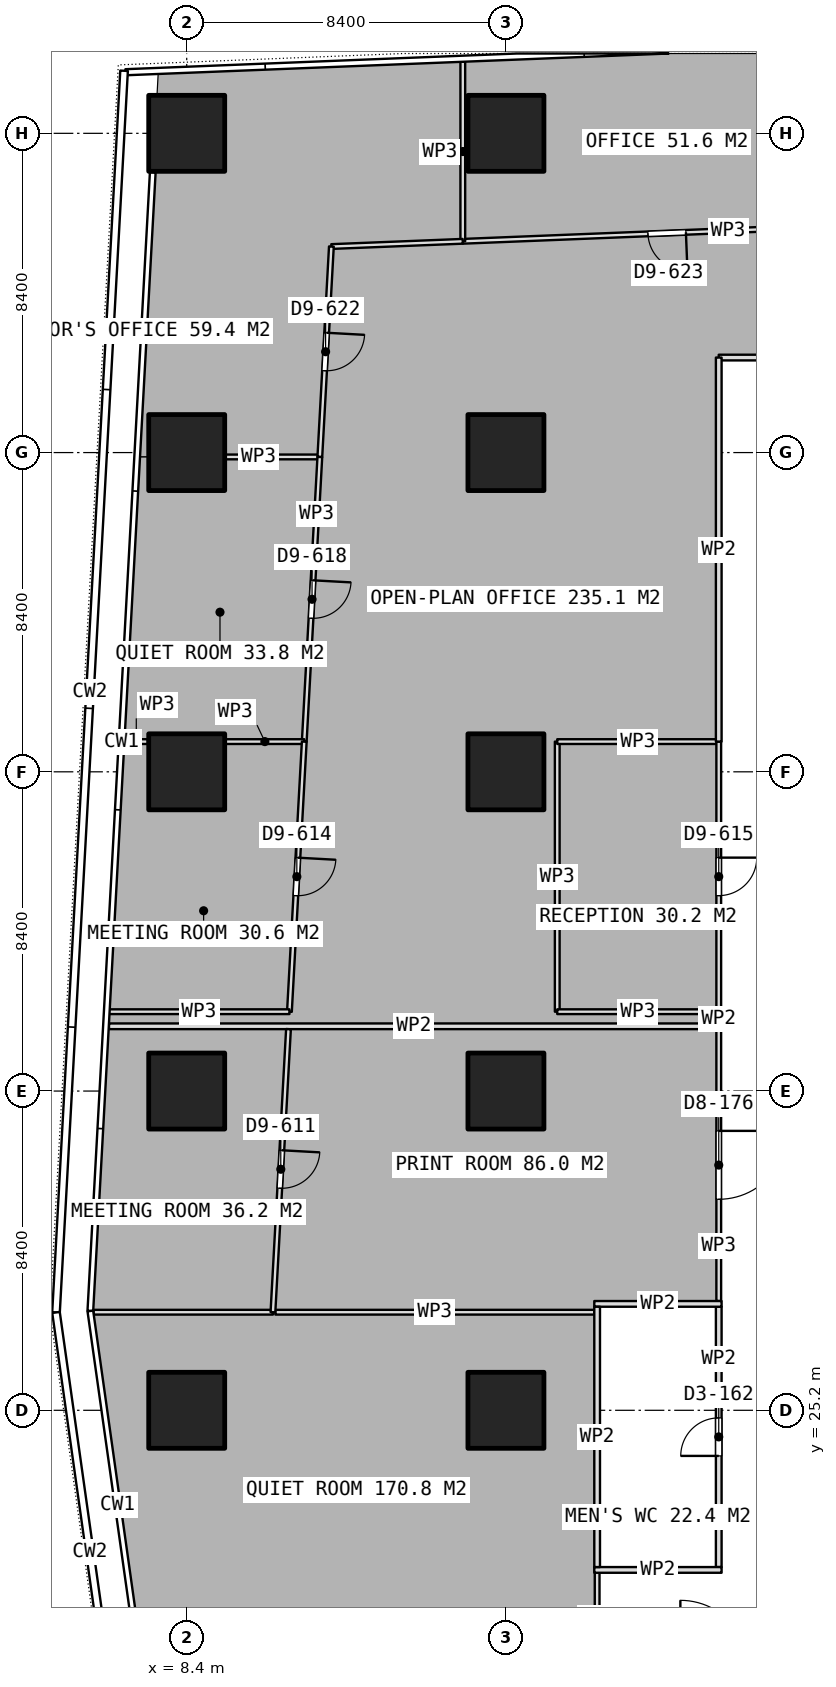
"""IFC4 building model, lengths in metres.
Left out: names, types, materials, properties, quantities, classifications, styles, units other than length and angle.
Written with IfcOpenShell. Run it as: python <this file> out.ifc"""

import sys

from ifc_helpers import new_model, si_unit, direction, frame, frame_2d, origin, origin_2d, place, context, subcontext, project, spatial, rectangle, extrude, element, fill, save


model = new_model("IFC4")
c1 = context("Model", 3, precision=1e-05, world=origin(), true_north=direction((0.0, 1.0)))
c2 = subcontext(c1, "Body", "Model", "MODEL_VIEW")
j1 = project(units=[si_unit("LENGTHUNIT", "METRE"), si_unit("PLANEANGLEUNIT", "RADIAN")], contexts=[c1])
p1 = place(None, origin())
s1 = spatial("IfcSite", under=j1, at=p1, CompositionType="ELEMENT")
p2 = place(p1, origin())
s2 = spatial("IfcBuilding", under=s1, at=p2, CompositionType="ELEMENT")
p3 = place(p2, frame((0.0, 0.0, 151.55)))
s3 = spatial("IfcBuildingStorey", under=s2, at=p3, CompositionType="ELEMENT", Elevation=151.55)
for number, where, z_axis, x_axis in (
    (1, (8.4, 25.2, 0.0), (0.0, 0.0, 1.0), (1.0, 0.0, 0.0)),
    (2, (8.4, 33.6, 0.0), (0.0, 0.0, 1.0), (1.0, 0.0, 0.0)),
    (3, (8.4, 42.0, 0.0), (0.0, 0.0, 1.0), (1.0, 0.0, 0.0)),
    (4, (8.4, 50.4, 0.0), (0.0, 0.0, 1.0), (1.0, 0.0, 0.0)),
    (5, (8.4, 58.8, 0.0), (0.0, 0.0, 1.0), (1.0, 0.0, 0.0)),
    (6, (16.8, 25.2, 0.0), (0.0, 0.0, 1.0), (1.0, 0.0, 0.0)),
    (7, (16.8, 33.6, 0.0), (0.0, 0.0, 1.0), (1.0, 0.0, 0.0)),
    (8, (16.8, 42.0, 0.0), (0.0, 0.0, 1.0), (1.0, 0.0, 0.0)),
    (9, (16.8, 50.4, 0.0), (0.0, 0.0, 1.0), (1.0, 0.0, 0.0)),
    (10, (16.8, 58.8, 0.0), (0.0, 0.0, 1.0), (1.0, 0.0, 0.0)),
):
    element("IfcColumn", number, at=place(p3, frame(where, z_axis=z_axis, x_axis=x_axis)), inside=s3, PredefinedType="COLUMN", context=c2, shape_type="SweptSolid", body=[
        extrude(rectangle(XDim=2.0, YDim=2.0, at=origin_2d()), origin(), (0.0, 0.0, 1.0), 3.75),
    ])
for number, where, z_axis, x_axis in (
    (11, (19.125, 21.0, 0.0), (0.0, 0.0, 1.0), (1.0, 0.0, 0.0)),
    (12, (19.125, 28.0, 0.0), (0.0, 0.0, 1.0), (1.0, 0.0, 0.0)),
):
    element("IfcWall", number, at=place(p3, frame(where, z_axis=z_axis, x_axis=x_axis)), inside=s3, PredefinedType="PARTITIONING", context=c2, shape_type="SweptSolid", body=[
        extrude(rectangle(XDim=3.35, YDim=0.15, at=frame_2d((1.675, 0.0))), origin(), (0.0, 0.0, 1.0), 3.5),
    ])
p4 = place(p3, frame((19.2, 21.075, 0.0), z_axis=(0.0, 0.0, 1.0), x_axis=(0.0, 1.0, 0.0)))
e13 = element("IfcWall", 13, at=p4, inside=s3, PredefinedType="PARTITIONING", context=c2, shape_type="SweptSolid", body=[
    extrude(rectangle(XDim=6.85, YDim=0.15, at=frame_2d((3.425, 0.0))), origin(), (0.0, 0.0, 1.0), 3.5),
])
p5 = place(p3, frame((22.4, 21.075, 0.0), z_axis=(0.0, 0.0, 1.0), x_axis=(0.0, 1.0, 0.0)))
e14 = element("IfcWall", 14, at=p5, inside=s3, PredefinedType="PARTITIONING", context=c2, shape_type="SweptSolid", body=[
    extrude(rectangle(XDim=6.85, YDim=0.15, at=frame_2d((3.425, 0.0))), origin(), (0.0, 0.0, 1.0), 3.5),
])
p6 = place(p5, frame((2.925, 0.0, 0.0)))
e15 = element("IfcOpeningElement", 15, at=p6, cuts=e14, PredefinedType="OPENING", context=c2, shape_type="SweptSolid", body=[
    extrude(rectangle(XDim=1.0, YDim=2.1, at=frame_2d((0.5, 1.05))), frame((0.0, 0.085, 0.0), z_axis=(0.0, -1.0, 0.0), x_axis=(1.0, 0.0, 0.0)), (0.0, 0.0, 1.0), 0.17),
])
p7 = place(p3, frame((5.949, 27.781, 0.0), z_axis=(0.0, 0.0, 1.0), x_axis=(1.0, 0.0, 0.0)))
e16 = element("IfcWall", 16, at=p7, inside=s3, PredefinedType="PARTITIONING", context=c2, shape_type="SweptSolid", body=[
    extrude(rectangle(XDim=4.72, YDim=0.125, at=frame_2d((2.36, 0.0))), origin(), (0.0, 0.0, 1.0), 3.5),
])
p8 = place(p3, frame((10.732, 27.781, 0.0), z_axis=(0.0, 0.0, 1.0), x_axis=(1.0, 0.0, 0.0)))
e17 = element("IfcWall", 17, at=p8, inside=s3, PredefinedType="PARTITIONING", context=c2, shape_type="SweptSolid", body=[
    extrude(rectangle(XDim=8.393, YDim=0.125, at=frame_2d((4.197, 0.0))), origin(), (0.0, 0.0, 1.0), 3.5),
])
p9 = place(p3, frame((19.2, 21.075, 0.0), z_axis=(0.0, 0.0, 1.0), x_axis=(0.0, -1.0, 0.0)))
e18 = element("IfcWall", 18, at=p9, inside=s3, PredefinedType="PARTITIONING", context=c2, shape_type="SweptSolid", body=[
    extrude(rectangle(XDim=2.675, YDim=0.125, at=frame_2d((1.337, 0.0))), origin(), (0.0, 0.0, 1.0), 3.5),
])
p10 = place(p3, frame((26.407, 56.39, 0.0), z_axis=(0.0, 0.0, 1.0), x_axis=(-0.999196381261, -0.040082311255, 0.0)))
e19 = element("IfcWall", 19, at=p10, inside=s3, PredefinedType="PARTITIONING", context=c2, shape_type="SweptSolid", body=[
    extrude(rectangle(XDim=10.75, YDim=0.125, at=frame_2d((5.375, 0.0))), origin(), (0.0, 0.0, 1.0), 3.5),
])
p11 = place(p10, frame((4.875, 0.0, 0.0)))
e20 = element("IfcOpeningElement", 20, at=p11, cuts=e19, PredefinedType="OPENING", context=c2, shape_type="SweptSolid", body=[
    extrude(rectangle(XDim=1.0, YDim=2.1, at=frame_2d((0.5, 1.05))), frame((0.0, 0.073, 0.0), z_axis=(0.0, -1.0, 0.0), x_axis=(1.0, 0.0, 0.0)), (0.0, 0.0, 1.0), 0.145),
])
p12 = place(p3, frame((15.665, 55.959, 0.0), z_axis=(0.0, 0.0, 1.0), x_axis=(0.0, 1.0, 0.0)))
e21 = element("IfcWall", 21, at=p12, inside=s3, PredefinedType="PARTITIONING", context=c2, shape_type="SweptSolid", body=[
    extrude(rectangle(XDim=4.724, YDim=0.125, at=frame_2d((2.362, 0.0))), origin(), (0.0, 0.0, 1.0), 3.5),
])
p13 = place(p3, frame((11.903, 50.285, 0.0), z_axis=(0.0, 0.0, 1.0), x_axis=(-1.0, 0.0, 0.0)))
e22 = element("IfcWall", 22, at=p13, inside=s3, PredefinedType="PARTITIONING", context=c2, shape_type="SweptSolid", body=[
    extrude(rectangle(XDim=2.483, YDim=0.125, at=frame_2d((1.242, 0.0))), origin(), (0.0, 0.0, 1.0), 3.5),
])
p14 = place(p3, frame((15.664, 55.959, 0.0), z_axis=(0.0, 0.0, 1.0), x_axis=(-0.999204899199, -0.039869404523, 0.0)))
e23 = element("IfcWall", 23, at=p14, inside=s3, PredefinedType="PARTITIONING", context=c2, shape_type="SweptSolid", body=[
    extrude(rectangle(XDim=3.46, YDim=0.125, at=frame_2d((1.73, 0.0))), origin(), (0.0, 0.0, 1.0), 3.5),
])
p15 = place(p3, frame((12.207, 55.821, 0.0), z_axis=(0.0, 0.0, 1.0), x_axis=(-0.054821297693, -0.998496181925, 0.0)))
e24 = element("IfcWall", 24, at=p15, inside=s3, PredefinedType="PARTITIONING", context=c2, shape_type="SweptSolid", body=[
    extrude(rectangle(XDim=5.544, YDim=0.125, at=frame_2d((2.772, 0.0))), origin(), (0.0, 0.0, 1.0), 3.5),
])
p16 = place(p15, frame((2.272, 0.0, 0.0)))
e25 = element("IfcOpeningElement", 25, at=p16, cuts=e24, PredefinedType="OPENING", context=c2, shape_type="SweptSolid", body=[
    extrude(rectangle(XDim=1.0, YDim=2.1, at=frame_2d((0.5, 1.05))), frame((0.0, 0.073, 0.0), z_axis=(0.0, -1.0, 0.0), x_axis=(1.0, 0.0, 0.0)), (0.0, 0.0, 1.0), 0.145),
])
p17 = place(p3, frame((11.903, 50.284, 0.0), z_axis=(0.0, 0.0, 1.0), x_axis=(-0.054685772478, -0.998503613558, 0.0)))
e26 = element("IfcWall", 26, at=p17, inside=s3, PredefinedType="PARTITIONING", context=c2, shape_type="SweptSolid", body=[
    extrude(rectangle(XDim=7.5, YDim=0.125, at=frame_2d((3.75, 0.0))), origin(), (0.0, 0.0, 1.0), 3.5),
])
p18 = place(p17, frame((3.25, 0.0, 0.0)))
e27 = element("IfcOpeningElement", 27, at=p18, cuts=e26, PredefinedType="OPENING", context=c2, shape_type="SweptSolid", body=[
    extrude(rectangle(XDim=1.0, YDim=2.1, at=frame_2d((0.5, 1.05))), frame((0.0, 0.073, 0.0), z_axis=(0.0, -1.0, 0.0), x_axis=(1.0, 0.0, 0.0)), (0.0, 0.0, 1.0), 0.145),
])
p19 = place(p3, frame((11.493, 42.795, 0.0), z_axis=(0.0, 0.0, 1.0), x_axis=(-1.0, 0.0, 0.0)))
e28 = element("IfcWall", 28, at=p19, inside=s3, PredefinedType="PARTITIONING", context=c2, shape_type="SweptSolid", body=[
    extrude(rectangle(XDim=2.073, YDim=0.125, at=frame_2d((1.037, 0.0))), origin(), (0.0, 0.0, 1.0), 3.5),
])
p20 = place(p3, frame((7.38, 42.795, 0.0), z_axis=(0.0, 0.0, 1.0), x_axis=(-1.0, 0.0, 0.0)))
e29 = element("IfcWall", 29, at=p20, inside=s3, PredefinedType="PARTITIONING", context=c2, shape_type="SweptSolid", body=[
    extrude(rectangle(XDim=0.614, YDim=0.125, at=frame_2d((0.307, 0.0))), origin(), (0.0, 0.0, 1.0), 3.5),
])
p21 = place(p3, frame((11.493, 42.794, 0.0), z_axis=(0.0, 0.0, 1.0), x_axis=(-0.054786006182, -0.99849811894, 0.0)))
e30 = element("IfcWall", 30, at=p21, inside=s3, PredefinedType="PARTITIONING", context=c2, shape_type="SweptSolid", body=[
    extrude(rectangle(XDim=7.117, YDim=0.125, at=frame_2d((3.558, 0.0))), origin(), (0.0, 0.0, 1.0), 3.5),
])
p22 = place(p21, frame((3.058, 0.0, 0.0)))
e31 = element("IfcOpeningElement", 31, at=p22, cuts=e30, PredefinedType="OPENING", context=c2, shape_type="SweptSolid", body=[
    extrude(rectangle(XDim=1.0, YDim=2.1, at=frame_2d((0.5, 1.05))), frame((0.0, 0.073, 0.0), z_axis=(0.0, -1.0, 0.0), x_axis=(1.0, 0.0, 0.0)), (0.0, 0.0, 1.0), 0.145),
])
p23 = place(p3, frame((11.103, 35.688, 0.0), z_axis=(0.0, 0.0, 1.0), x_axis=(-1.0, 0.0, 0.0)))
e32 = element("IfcWall", 32, at=p23, inside=s3, PredefinedType="PARTITIONING", context=c2, shape_type="SweptSolid", body=[
    extrude(rectangle(XDim=4.757, YDim=0.125, at=frame_2d((2.378, 0.0))), origin(), (0.0, 0.0, 1.0), 3.5),
])
p24 = place(p3, frame((18.15, 35.688, 0.0), z_axis=(0.0, 0.0, 1.0), x_axis=(0.0, 1.0, 0.0)))
e33 = element("IfcWall", 33, at=p24, inside=s3, PredefinedType="PARTITIONING", context=c2, shape_type="SweptSolid", body=[
    extrude(rectangle(XDim=7.107, YDim=0.125, at=frame_2d((3.553, 0.0))), origin(), (0.0, 0.0, 1.0), 3.5),
])
p25 = place(p3, frame((18.15, 42.795, 0.0), z_axis=(0.0, 0.0, 1.0), x_axis=(1.0, 0.0, 0.0)))
e34 = element("IfcWall", 34, at=p25, inside=s3, PredefinedType="PARTITIONING", context=c2, shape_type="SweptSolid", body=[
    extrude(rectangle(XDim=4.25, YDim=0.125, at=frame_2d((2.125, 0.0))), origin(), (0.0, 0.0, 1.0), 3.5),
])
p26 = place(p3, frame((22.4, 42.795, 0.0), z_axis=(0.0, 0.0, 1.0), x_axis=(0.0, -1.0, 0.0)))
e35 = element("IfcWall", 35, at=p26, inside=s3, PredefinedType="PARTITIONING", context=c2, shape_type="SweptSolid", body=[
    extrude(rectangle(XDim=7.107, YDim=0.125, at=frame_2d((3.553, 0.0))), origin(), (0.0, 0.0, 1.0), 3.5),
])
p27 = place(p26, frame((3.053, 0.0, 0.0)))
e36 = element("IfcOpeningElement", 36, at=p27, cuts=e35, PredefinedType="OPENING", context=c2, shape_type="SweptSolid", body=[
    extrude(rectangle(XDim=1.0, YDim=2.1, at=frame_2d((0.5, 1.05))), frame((0.0, 0.073, 0.0), z_axis=(0.0, -1.0, 0.0), x_axis=(1.0, 0.0, 0.0)), (0.0, 0.0, 1.0), 0.145),
])
p28 = place(p3, frame((22.4, 35.688, 0.0), z_axis=(0.0, 0.0, 1.0), x_axis=(-1.0, 0.0, 0.0)))
e37 = element("IfcWall", 37, at=p28, inside=s3, PredefinedType="PARTITIONING", context=c2, shape_type="SweptSolid", body=[
    extrude(rectangle(XDim=4.25, YDim=0.125, at=frame_2d((2.125, 0.0))), origin(), (0.0, 0.0, 1.0), 3.5),
])
p29 = place(p3, frame((22.4, 35.688, 0.0), z_axis=(0.0, 0.0, 1.0), x_axis=(0.0, -1.0, 0.0)))
e38 = element("IfcWall", 38, at=p29, inside=s3, PredefinedType="PARTITIONING", context=c2, shape_type="SweptSolid", body=[
    extrude(rectangle(XDim=0.384, YDim=0.15, at=frame_2d((0.192, 0.0))), origin(), (0.0, 0.0, 1.0), 3.5),
])
p30 = place(p3, frame((22.4, 35.304, 0.0), z_axis=(0.0, 0.0, 1.0), x_axis=(-1.0, 0.0, 0.0)))
e39 = element("IfcWall", 39, at=p30, inside=s3, PredefinedType="PARTITIONING", context=c2, shape_type="SweptSolid", body=[
    extrude(rectangle(XDim=16.045, YDim=0.15, at=frame_2d((8.022, 0.0))), origin(), (0.0, 0.0, 1.0), 3.5),
])
p31 = place(p3, frame((33.826, 52.9, 0.0), z_axis=(0.0, 0.0, 1.0), x_axis=(-1.0, 0.0, 0.0)))
e40 = element("IfcWall", 40, at=p31, inside=s3, PredefinedType="PARTITIONING", context=c2, shape_type="SweptSolid", body=[
    extrude(rectangle(XDim=11.426, YDim=0.15, at=frame_2d((5.713, 0.0))), origin(), (0.0, 0.0, 1.0), 3.5),
])
p32 = place(p31, frame((5.213, 0.0, 0.0)))
e41 = element("IfcOpeningElement", 41, at=p32, cuts=e40, PredefinedType="OPENING", context=c2, shape_type="SweptSolid", body=[
    extrude(rectangle(XDim=1.0, YDim=2.1, at=frame_2d((0.5, 1.05))), frame((0.0, 0.085, 0.0), z_axis=(0.0, -1.0, 0.0), x_axis=(1.0, 0.0, 0.0)), (0.0, 0.0, 1.0), 0.17),
])
p33 = place(p3, frame((22.4, 52.9, 0.0), z_axis=(0.0, 0.0, 1.0), x_axis=(0.0, -1.0, 0.0)))
e42 = element("IfcWall", 42, at=p33, inside=s3, PredefinedType="PARTITIONING", context=c2, shape_type="SweptSolid", body=[
    extrude(rectangle(XDim=10.105, YDim=0.15, at=frame_2d((5.052, 0.0))), origin(), (0.0, 0.0, 1.0), 3.5),
])
p34 = place(p3, frame((11.078, 35.229, 0.0), z_axis=(0.0, 0.0, 1.0), x_axis=(-0.054822859053, -0.998496096199, 0.0)))
e43 = element("IfcWall", 43, at=p34, inside=s3, PredefinedType="PARTITIONING", context=c2, shape_type="SweptSolid", body=[
    extrude(rectangle(XDim=7.459, YDim=0.125, at=frame_2d((3.729, 0.0))), origin(), (0.0, 0.0, 1.0), 3.5),
])
p35 = place(p34, frame((3.192, 0.0, 0.0)))
e44 = element("IfcOpeningElement", 44, at=p35, cuts=e43, PredefinedType="OPENING", context=c2, shape_type="SweptSolid", body=[
    extrude(rectangle(XDim=1.0, YDim=2.1, at=frame_2d((0.5, 1.05))), frame((0.0, 0.073, 0.0), z_axis=(0.0, -1.0, 0.0), x_axis=(1.0, 0.0, 0.0)), (0.0, 0.0, 1.0), 0.145),
])
p36 = place(p3, frame((22.4, 35.304, 0.0), z_axis=(0.0, 0.0, 1.0), x_axis=(0.0, -1.0, 0.0)))
e45 = element("IfcWall", 45, at=p36, inside=s3, PredefinedType="PARTITIONING", context=c2, shape_type="SweptSolid", body=[
    extrude(rectangle(XDim=7.229, YDim=0.125, at=frame_2d((3.615, 0.0))), origin(), (0.0, 0.0, 1.0), 3.5),
])
p37 = place(p36, frame((2.752, 0.0, 0.0)))
e46 = element("IfcOpeningElement", 46, at=p37, cuts=e45, PredefinedType="OPENING", context=c2, shape_type="SweptSolid", body=[
    extrude(rectangle(XDim=1.8, YDim=2.1, at=frame_2d((0.9, 1.05))), frame((0.0, 0.073, 0.0), z_axis=(0.0, -1.0, 0.0), x_axis=(1.0, 0.0, 0.0)), (0.0, 0.0, 1.0), 0.145),
])
p38 = place(p6, origin())
e47 = element("IfcDoor", 47, at=p38, inside=s3, OperationType="SINGLE_SWING_LEFT", PredefinedType="DOOR", context=c2, shape_type="SweptSolid", body=[
    extrude(rectangle(XDim=1.0, YDim=2.1, at=frame_2d((0.5, 1.05))), frame((0.0, 0.025, 0.0), z_axis=(0.0, -1.0, 0.0), x_axis=(1.0, 0.0, 0.0)), (0.0, 0.0, 1.0), 0.05),
])
fill(e15, e47)
p39 = place(p11, origin())
e48 = element("IfcDoor", 48, at=p39, inside=s3, OperationType="SINGLE_SWING_LEFT", PredefinedType="DOOR", context=c2, shape_type="SweptSolid", body=[
    extrude(rectangle(XDim=1.0, YDim=2.1, at=frame_2d((0.5, 1.05))), frame((0.0, 0.025, 0.0), z_axis=(0.0, -1.0, 0.0), x_axis=(1.0, 0.0, 0.0)), (0.0, 0.0, 1.0), 0.05),
])
fill(e20, e48)
p40 = place(p16, origin())
e49 = element("IfcDoor", 49, at=p40, inside=s3, OperationType="SINGLE_SWING_LEFT", PredefinedType="DOOR", context=c2, shape_type="SweptSolid", body=[
    extrude(rectangle(XDim=1.0, YDim=2.1, at=frame_2d((0.5, 1.05))), frame((0.0, 0.025, 0.0), z_axis=(0.0, -1.0, 0.0), x_axis=(1.0, 0.0, 0.0)), (0.0, 0.0, 1.0), 0.05),
])
fill(e25, e49)
p41 = place(p18, origin())
e50 = element("IfcDoor", 50, at=p41, inside=s3, OperationType="SINGLE_SWING_LEFT", PredefinedType="DOOR", context=c2, shape_type="SweptSolid", body=[
    extrude(rectangle(XDim=1.0, YDim=2.1, at=frame_2d((0.5, 1.05))), frame((0.0, 0.025, 0.0), z_axis=(0.0, -1.0, 0.0), x_axis=(1.0, 0.0, 0.0)), (0.0, 0.0, 1.0), 0.05),
])
fill(e27, e50)
p42 = place(p22, origin())
e51 = element("IfcDoor", 51, at=p42, inside=s3, OperationType="SINGLE_SWING_LEFT", PredefinedType="DOOR", context=c2, shape_type="SweptSolid", body=[
    extrude(rectangle(XDim=1.0, YDim=2.1, at=frame_2d((0.5, 1.05))), frame((0.0, 0.025, 0.0), z_axis=(0.0, -1.0, 0.0), x_axis=(1.0, 0.0, 0.0)), (0.0, 0.0, 1.0), 0.05),
])
fill(e31, e51)
p43 = place(p27, origin())
e52 = element("IfcDoor", 52, at=p43, inside=s3, OperationType="SINGLE_SWING_LEFT", PredefinedType="DOOR", context=c2, shape_type="SweptSolid", body=[
    extrude(rectangle(XDim=1.0, YDim=2.1, at=frame_2d((0.5, 1.05))), frame((0.0, 0.025, 0.0), z_axis=(0.0, -1.0, 0.0), x_axis=(1.0, 0.0, 0.0)), (0.0, 0.0, 1.0), 0.05),
])
fill(e36, e52)
p44 = place(p37, origin())
e53 = element("IfcDoor", 53, at=p44, inside=s3, OperationType="DOUBLE_DOOR_SINGLE_SWING", PredefinedType="DOOR", context=c2, shape_type="SweptSolid", body=[
    extrude(rectangle(XDim=1.8, YDim=2.1, at=frame_2d((0.9, 1.05))), frame((0.0, 0.025, 0.0), z_axis=(0.0, -1.0, 0.0), x_axis=(1.0, 0.0, 0.0)), (0.0, 0.0, 1.0), 0.05),
])
fill(e46, e53)
p45 = place(p35, origin())
e54 = element("IfcDoor", 54, at=p45, inside=s3, OperationType="SINGLE_SWING_LEFT", PredefinedType="DOOR", context=c2, shape_type="SweptSolid", body=[
    extrude(rectangle(XDim=1.0, YDim=2.1, at=frame_2d((0.5, 1.05))), frame((0.0, 0.025, 0.0), z_axis=(0.0, -1.0, 0.0), x_axis=(1.0, 0.0, 0.0)), (0.0, 0.0, 1.0), 0.05),
])
fill(e44, e54)
save(model, sys.argv[1])
